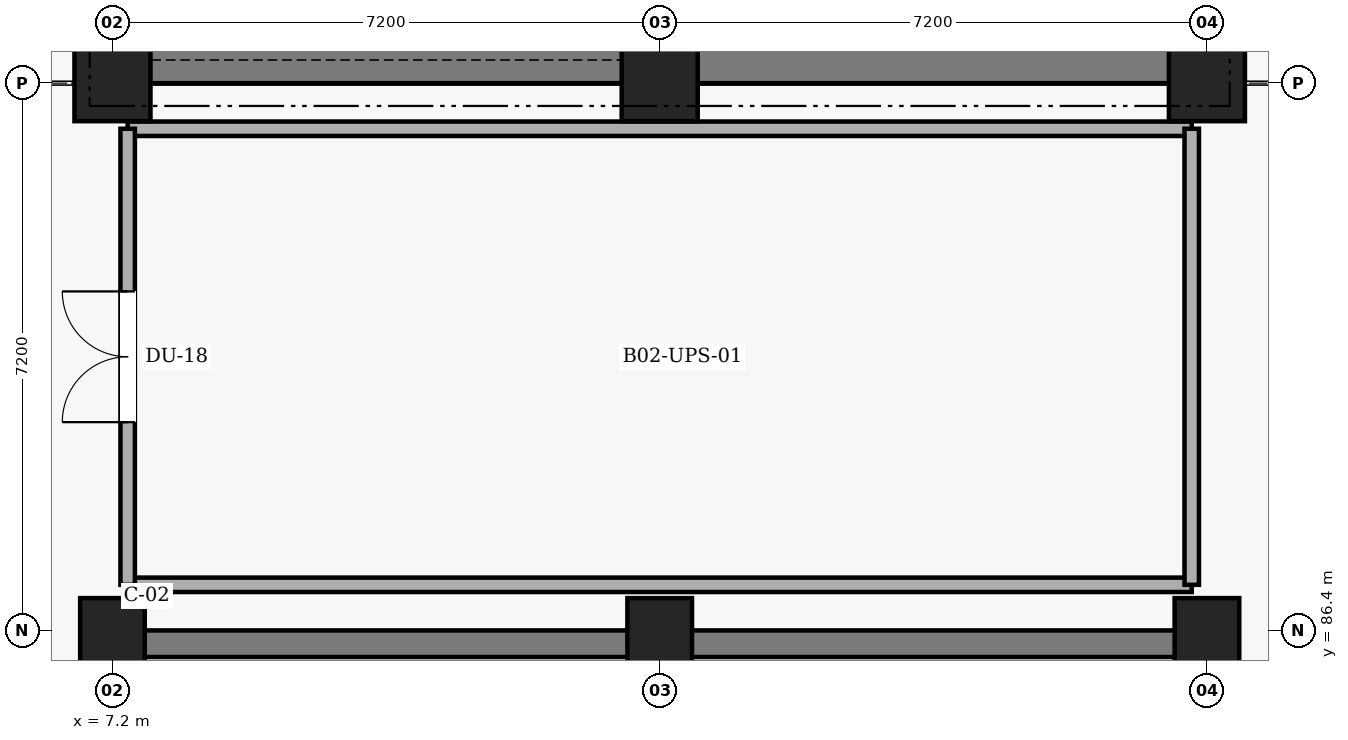
"""IFC4 building model, lengths in metres.
Left out: names, types, materials, properties, quantities, classifications, styles, units other than length and angle.
Written with IfcOpenShell. Run it as: python <this file> out.ifc"""

import sys

from ifc_helpers import new_model, si_unit, direction, frame, frame_2d, origin, origin_2d, place, context, subcontext, project, spatial, rectangle, extrude, element, fill, save


model = new_model("IFC4")
c1 = context("Model", 3, precision=1e-05, world=origin(), true_north=direction((0.0, 1.0)))
c2 = subcontext(c1, "Body", "Model", "MODEL_VIEW")
j1 = project(units=[si_unit("LENGTHUNIT", "METRE"), si_unit("PLANEANGLEUNIT", "RADIAN")], contexts=[c1])
p1 = place(None, origin())
s1 = spatial("IfcSite", under=j1, at=p1, CompositionType="ELEMENT")
p2 = place(p1, origin())
s2 = spatial("IfcBuilding", under=s1, at=p2, CompositionType="ELEMENT")
p3 = place(p2, frame((0.0, 0.0, -10.8)))
s3 = spatial("IfcBuildingStorey", under=s2, at=p3, CompositionType="ELEMENT", Elevation=-10.8)
p4 = place(p3, frame((21.6, 93.825, 0.0), z_axis=(0.0, 0.0, 1.0), x_axis=(-1.0, 0.0, 0.0)))
e1 = element("IfcWall", 1, at=p4, inside=s3, PredefinedType="SHEAR", context=c2, shape_type="SweptSolid", body=[
    extrude(rectangle(XDim=14.4, YDim=0.45, at=frame_2d((7.2, 0.0))), origin(), (0.0, 0.0, 1.0), 5.4),
])
p5 = place(p3, frame((7.2, 86.225, 0.0), z_axis=(0.0, 0.0, 1.0), x_axis=(1.0, 0.0, 0.0)))
e2 = element("IfcWall", 2, at=p5, inside=s3, PredefinedType="SHEAR", context=c2, shape_type="SweptSolid", body=[
    extrude(rectangle(XDim=14.4, YDim=0.35, at=frame_2d((7.2, 0.0))), origin(), (0.0, 0.0, 1.0), 5.4),
])
for number, where, z_axis, x_axis in (
    (3, (21.425, 86.05, 0.0), (0.0, 0.0, 1.0), (0.0, -1.0, 0.0)),
    (4, (7.375, 72.35, 0.0), (0.0, 0.0, 1.0), (0.0, 1.0, 0.0)),
    (5, (14.4, 86.05, 0.0), (0.0, 0.0, 1.0), (0.0, -1.0, 0.0)),
):
    element("IfcWall", number, at=place(p3, frame(where, z_axis=z_axis, x_axis=x_axis)), inside=s3, PredefinedType="SHEAR", context=c2, shape_type="SweptSolid", body=[
        extrude(rectangle(XDim=13.7, YDim=0.35, at=frame_2d((6.85, 0.0))), origin(), (0.0, 0.0, 1.0), 5.4),
    ])
p6 = place(p3, frame((7.2, 86.4, 0.0), z_axis=(0.0, 0.0, 1.0), x_axis=(1.0, 0.0, 0.0)))
e6 = element("IfcColumn", 6, at=p6, inside=s3, PredefinedType="COLUMN", context=c2, shape_type="SweptSolid", body=[
    extrude(rectangle(XDim=0.85, YDim=0.85, at=origin_2d()), origin(), (0.0, 0.0, 1.0), 5.0),
])
p7 = place(p3, frame((7.2, 93.6, 0.0), z_axis=(0.0, 0.0, 1.0), x_axis=(1.0, 0.0, 0.0)))
e7 = element("IfcColumn", 7, at=p7, inside=s3, PredefinedType="COLUMN", context=c2, shape_type="SweptSolid", body=[
    extrude(rectangle(XDim=1.0, YDim=1.0, at=origin_2d()), origin(), (0.0, 0.0, 1.0), 5.0),
])
p8 = place(p3, frame((14.4, 86.4, 0.0), z_axis=(0.0, 0.0, 1.0), x_axis=(1.0, 0.0, 0.0)))
e8 = element("IfcColumn", 8, at=p8, inside=s3, PredefinedType="COLUMN", context=c2, shape_type="SweptSolid", body=[
    extrude(rectangle(XDim=0.85, YDim=0.85, at=origin_2d()), origin(), (0.0, 0.0, 1.0), 5.0),
])
p9 = place(p3, frame((14.4, 93.6, 0.0), z_axis=(0.0, 0.0, 1.0), x_axis=(1.0, 0.0, 0.0)))
e9 = element("IfcColumn", 9, at=p9, inside=s3, PredefinedType="COLUMN", context=c2, shape_type="SweptSolid", body=[
    extrude(rectangle(XDim=1.0, YDim=1.0, at=origin_2d()), origin(), (0.0, 0.0, 1.0), 5.0),
])
p10 = place(p3, frame((21.6, 86.4, 0.0), z_axis=(0.0, 0.0, 1.0), x_axis=(1.0, 0.0, 0.0)))
e10 = element("IfcColumn", 10, at=p10, inside=s3, PredefinedType="COLUMN", context=c2, shape_type="SweptSolid", body=[
    extrude(rectangle(XDim=0.85, YDim=0.85, at=origin_2d()), origin(), (0.0, 0.0, 1.0), 5.0),
])
p11 = place(p3, frame((21.6, 93.6, 0.0), z_axis=(0.0, 0.0, 1.0), x_axis=(1.0, 0.0, 0.0)))
e11 = element("IfcColumn", 11, at=p11, inside=s3, PredefinedType="COLUMN", context=c2, shape_type="SweptSolid", body=[
    extrude(rectangle(XDim=1.0, YDim=1.0, at=origin_2d()), origin(), (0.0, 0.0, 1.0), 5.0),
])
for number, where, z_axis, x_axis in (
    (12, (7.4, 93.0, 0.0), (0.0, 0.0, 1.0), (1.0, 0.0, 0.0)),
    (13, (21.4, 87.0, 0.0), (0.0, 0.0, 1.0), (-1.0, 0.0, 0.0)),
):
    element("IfcWall", number, at=place(p3, frame(where, z_axis=z_axis, x_axis=x_axis)), inside=s3, PredefinedType="PARTITIONING", context=c2, shape_type="SweptSolid", body=[
        extrude(rectangle(XDim=14.0, YDim=0.19, at=frame_2d((7.0, 0.0))), origin(), (0.0, 0.0, 1.0), 4.22),
    ])
p12 = place(p3, frame((21.4, 93.0, 0.0), z_axis=(0.0, 0.0, 1.0), x_axis=(0.0, -1.0, 0.0)))
e14 = element("IfcWall", 14, at=p12, inside=s3, PredefinedType="PARTITIONING", context=c2, shape_type="SweptSolid", body=[
    extrude(rectangle(XDim=6.0, YDim=0.19, at=frame_2d((3.0, 0.0))), origin(), (0.0, 0.0, 1.0), 4.22),
])
p13 = place(p3, frame((7.4, 87.0, 0.0), z_axis=(0.0, 0.0, 1.0), x_axis=(0.0, 1.0, 0.0)))
e15 = element("IfcWall", 15, at=p13, inside=s3, PredefinedType="PARTITIONING", context=c2, shape_type="SweptSolid", body=[
    extrude(rectangle(XDim=6.0, YDim=0.19, at=frame_2d((3.0, 0.0))), origin(), (0.0, 0.0, 1.0), 4.22),
])
p14 = place(p13, frame((2.14, 0.0, 0.0)))
e16 = element("IfcOpeningElement", 16, at=p14, cuts=e15, PredefinedType="OPENING", context=c2, shape_type="SweptSolid", body=[
    extrude(rectangle(XDim=1.72, YDim=2.22, at=frame_2d((0.86, 1.11))), frame((0.0, 0.105, 0.0), z_axis=(0.0, -1.0, 0.0), x_axis=(1.0, 0.0, 0.0)), (0.0, 0.0, 1.0), 0.21),
])
p15 = place(p14, origin())
e17 = element("IfcDoor", 17, at=p15, inside=s3, OperationType="DOUBLE_DOOR_SINGLE_SWING", PredefinedType="DOOR", context=c2, shape_type="SweptSolid", body=[
    extrude(rectangle(XDim=1.72, YDim=2.22, at=frame_2d((0.86, 1.11))), frame((0.0, 0.025, 0.0), z_axis=(0.0, -1.0, 0.0), x_axis=(1.0, 0.0, 0.0)), (0.0, 0.0, 1.0), 0.05),
])
fill(e16, e17)
save(model, sys.argv[1])
